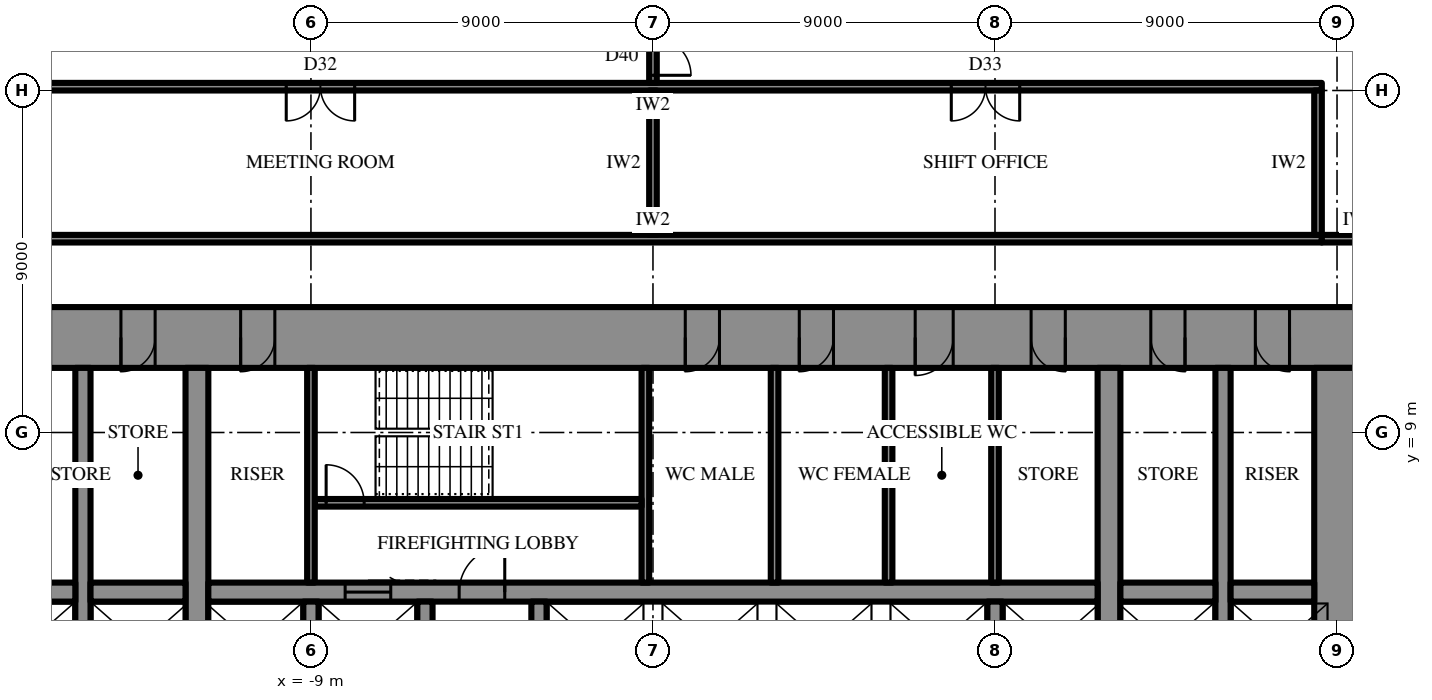
"""IFC4 building model, lengths in metres.
Left out: names, types, materials, properties, quantities, classifications, styles, units other than length and angle.
Written with IfcOpenShell. Run it as: python <this file> out.ifc"""

import sys

from ifc_helpers import new_model, si_unit, direction, frame, frame_2d, origin, place, context, subcontext, project, spatial, rectangle, extrude, element, fill, save


model = new_model("IFC4")
c1 = context("Model", 3, precision=1e-05, world=origin(), true_north=direction((0.0, 1.0)))
c2 = subcontext(c1, "Body", "Model", "MODEL_VIEW")
j1 = project(units=[si_unit("LENGTHUNIT", "METRE"), si_unit("PLANEANGLEUNIT", "RADIAN")], contexts=[c1])
p1 = place(None, origin())
s1 = spatial("IfcSite", under=j1, at=p1, CompositionType="ELEMENT")
p2 = place(p1, origin())
s2 = spatial("IfcBuilding", under=s1, at=p2, CompositionType="ELEMENT")
p3 = place(p2, frame((0.0, 0.0, 31.9)))
s3 = spatial("IfcBuildingStorey", under=s2, at=p3, CompositionType="ELEMENT", Elevation=31.9)
p4 = place(p3, frame((-18.6, 11.5, 0.0), z_axis=(0.0, 0.0, 1.0), x_axis=(1.0, 0.0, 0.0)))
e1 = element("IfcWall", 1, at=p4, inside=s3, PredefinedType="SHEAR", context=c2, shape_type="SweptSolid", body=[
    extrude(rectangle(XDim=37.2, YDim=1.6, at=frame_2d((18.6, 0.0))), origin(), (0.0, 0.0, 1.0), 4.2),
])
p5 = place(p4, frame((19.45, 0.0, 0.0)))
e2 = element("IfcOpeningElement", 2, at=p5, cuts=e1, PredefinedType="OPENING", context=c2, shape_type="SweptSolid", body=[
    extrude(rectangle(XDim=0.9, YDim=2.2, at=frame_2d((0.45, 1.1))), frame((0.0, 0.81, 0.0), z_axis=(0.0, -1.0, 0.0), x_axis=(1.0, 0.0, 0.0)), (0.0, 0.0, 1.0), 1.62),
])
p6 = place(p4, frame((22.45, 0.0, 0.0)))
e3 = element("IfcOpeningElement", 3, at=p6, cuts=e1, PredefinedType="OPENING", context=c2, shape_type="SweptSolid", body=[
    extrude(rectangle(XDim=0.9, YDim=2.2, at=frame_2d((0.45, 1.1))), frame((0.0, 0.81, 0.0), z_axis=(0.0, -1.0, 0.0), x_axis=(1.0, 0.0, 0.0)), (0.0, 0.0, 1.0), 1.62),
])
p7 = place(p4, frame((25.5, 0.0, 0.0)))
e4 = element("IfcOpeningElement", 4, at=p7, cuts=e1, PredefinedType="OPENING", context=c2, shape_type="SweptSolid", body=[
    extrude(rectangle(XDim=1.0, YDim=2.2, at=frame_2d((0.5, 1.1))), frame((0.0, 0.81, 0.0), z_axis=(0.0, -1.0, 0.0), x_axis=(1.0, 0.0, 0.0)), (0.0, 0.0, 1.0), 1.62),
])
p8 = place(p4, frame((1.85, 0.0, 0.0)))
e5 = element("IfcOpeningElement", 5, at=p8, cuts=e1, PredefinedType="OPENING", context=c2, shape_type="SweptSolid", body=[
    extrude(rectangle(XDim=0.9, YDim=2.2, at=frame_2d((0.45, 1.1))), frame((0.0, 0.81, 0.0), z_axis=(0.0, -1.0, 0.0), x_axis=(1.0, 0.0, 0.0)), (0.0, 0.0, 1.0), 1.62),
])
p9 = place(p4, frame((4.6, 0.0, 0.0)))
e6 = element("IfcOpeningElement", 6, at=p9, cuts=e1, PredefinedType="OPENING", context=c2, shape_type="SweptSolid", body=[
    extrude(rectangle(XDim=0.9, YDim=2.2, at=frame_2d((0.45, 1.1))), frame((0.0, 0.81, 0.0), z_axis=(0.0, -1.0, 0.0), x_axis=(1.0, 0.0, 0.0)), (0.0, 0.0, 1.0), 1.62),
])
p10 = place(p4, frame((7.75, 0.0, 0.0)))
e7 = element("IfcOpeningElement", 7, at=p10, cuts=e1, PredefinedType="OPENING", context=c2, shape_type="SweptSolid", body=[
    extrude(rectangle(XDim=0.9, YDim=2.2, at=frame_2d((0.45, 1.1))), frame((0.0, 0.81, 0.0), z_axis=(0.0, -1.0, 0.0), x_axis=(1.0, 0.0, 0.0)), (0.0, 0.0, 1.0), 1.62),
])
p11 = place(p4, frame((28.55, 0.0, 0.0)))
e8 = element("IfcOpeningElement", 8, at=p11, cuts=e1, PredefinedType="OPENING", context=c2, shape_type="SweptSolid", body=[
    extrude(rectangle(XDim=0.9, YDim=2.2, at=frame_2d((0.45, 1.1))), frame((0.0, 0.81, 0.0), z_axis=(0.0, -1.0, 0.0), x_axis=(1.0, 0.0, 0.0)), (0.0, 0.0, 1.0), 1.62),
])
p12 = place(p4, frame((31.7, 0.0, 0.0)))
e9 = element("IfcOpeningElement", 9, at=p12, cuts=e1, PredefinedType="OPENING", context=c2, shape_type="SweptSolid", body=[
    extrude(rectangle(XDim=0.9, YDim=2.2, at=frame_2d((0.45, 1.1))), frame((0.0, 0.81, 0.0), z_axis=(0.0, -1.0, 0.0), x_axis=(1.0, 0.0, 0.0)), (0.0, 0.0, 1.0), 1.62),
])
p13 = place(p4, frame((34.45, 0.0, 0.0)))
e10 = element("IfcOpeningElement", 10, at=p13, cuts=e1, PredefinedType="OPENING", context=c2, shape_type="SweptSolid", body=[
    extrude(rectangle(XDim=0.9, YDim=2.2, at=frame_2d((0.45, 1.1))), frame((0.0, 0.81, 0.0), z_axis=(0.0, -1.0, 0.0), x_axis=(1.0, 0.0, 0.0)), (0.0, 0.0, 1.0), 1.62),
])
p14 = place(p3, frame((18.0, -10.7, 0.0), z_axis=(0.0, 0.0, 1.0), x_axis=(0.0, 1.0, 0.0)))
e11 = element("IfcWall", 11, at=p14, inside=s3, PredefinedType="SHEAR", context=c2, shape_type="SweptSolid", body=[
    extrude(rectangle(XDim=21.4, YDim=1.2, at=frame_2d((10.7, 0.0))), origin(), (0.0, 0.0, 1.0), 4.2),
])
p15 = place(p14, frame((9.8, 0.0, 0.0)))
e12 = element("IfcOpeningElement", 12, at=p15, cuts=e11, PredefinedType="OPENING", context=c2, shape_type="SweptSolid", body=[
    extrude(rectangle(XDim=1.8, YDim=2.4, at=frame_2d((0.9, 1.2))), frame((0.0, 0.61, 0.0), z_axis=(0.0, -1.0, 0.0), x_axis=(1.0, 0.0, 0.0)), (0.0, 0.0, 1.0), 1.22),
])
p16 = place(p3, frame((12.0, -10.7, 0.0), z_axis=(0.0, 0.0, 1.0), x_axis=(0.0, 1.0, 0.0)))
e13 = element("IfcWall", 13, at=p16, inside=s3, PredefinedType="SHEAR", context=c2, shape_type="SweptSolid", body=[
    extrude(rectangle(XDim=21.4, YDim=0.6, at=frame_2d((10.7, 0.0))), origin(), (0.0, 0.0, 1.0), 4.2),
])
p17 = place(p16, frame((9.8, 0.0, 0.0)))
e14 = element("IfcOpeningElement", 14, at=p17, cuts=e13, PredefinedType="OPENING", context=c2, shape_type="SweptSolid", body=[
    extrude(rectangle(XDim=1.8, YDim=2.4, at=frame_2d((0.9, 1.2))), frame((0.0, 0.31, 0.0), z_axis=(0.0, -1.0, 0.0), x_axis=(1.0, 0.0, 0.0)), (0.0, 0.0, 1.0), 0.62),
])
p18 = place(p3, frame((-12.0, -10.7, 0.0), z_axis=(0.0, 0.0, 1.0), x_axis=(0.0, 1.0, 0.0)))
e15 = element("IfcWall", 15, at=p18, inside=s3, PredefinedType="SHEAR", context=c2, shape_type="SweptSolid", body=[
    extrude(rectangle(XDim=21.4, YDim=0.6, at=frame_2d((10.7, 0.0))), origin(), (0.0, 0.0, 1.0), 4.2),
])
p19 = place(p18, frame((9.8, 0.0, 0.0)))
e16 = element("IfcOpeningElement", 16, at=p19, cuts=e15, PredefinedType="OPENING", context=c2, shape_type="SweptSolid", body=[
    extrude(rectangle(XDim=1.8, YDim=2.4, at=frame_2d((0.9, 1.2))), frame((0.0, 0.31, 0.0), z_axis=(0.0, -1.0, 0.0), x_axis=(1.0, 0.0, 0.0)), (0.0, 0.0, 1.0), 0.62),
])
p20 = place(p3, frame((15.0, -10.7, 0.0), z_axis=(0.0, 0.0, 1.0), x_axis=(0.0, 1.0, 0.0)))
e17 = element("IfcWall", 17, at=p20, inside=s3, PredefinedType="SHEAR", context=c2, shape_type="SweptSolid", body=[
    extrude(rectangle(XDim=21.4, YDim=0.4, at=frame_2d((10.7, 0.0))), origin(), (0.0, 0.0, 1.0), 4.2),
])
p21 = place(p20, frame((9.8, 0.0, 0.0)))
e18 = element("IfcOpeningElement", 18, at=p21, cuts=e17, PredefinedType="OPENING", context=c2, shape_type="SweptSolid", body=[
    extrude(rectangle(XDim=1.8, YDim=2.4, at=frame_2d((0.9, 1.2))), frame((0.0, 0.21, 0.0), z_axis=(0.0, -1.0, 0.0), x_axis=(1.0, 0.0, 0.0)), (0.0, 0.0, 1.0), 0.42),
])
p22 = place(p3, frame((-15.0, -10.7, 0.0), z_axis=(0.0, 0.0, 1.0), x_axis=(0.0, 1.0, 0.0)))
e19 = element("IfcWall", 19, at=p22, inside=s3, PredefinedType="SHEAR", context=c2, shape_type="SweptSolid", body=[
    extrude(rectangle(XDim=21.4, YDim=0.4, at=frame_2d((10.7, 0.0))), origin(), (0.0, 0.0, 1.0), 4.2),
])
p23 = place(p22, frame((9.8, 0.0, 0.0)))
e20 = element("IfcOpeningElement", 20, at=p23, cuts=e19, PredefinedType="OPENING", context=c2, shape_type="SweptSolid", body=[
    extrude(rectangle(XDim=1.8, YDim=2.4, at=frame_2d((0.9, 1.2))), frame((0.0, 0.21, 0.0), z_axis=(0.0, -1.0, 0.0), x_axis=(1.0, 0.0, 0.0)), (0.0, 0.0, 1.0), 0.42),
])
p24 = place(p3, frame((-17.4, 4.8, 0.0), z_axis=(0.0, 0.0, 1.0), x_axis=(1.0, 0.0, 0.0)))
e21 = element("IfcWall", 21, at=p24, inside=s3, PredefinedType="SHEAR", context=c2, shape_type="SweptSolid", body=[
    extrude(rectangle(XDim=2.2, YDim=0.5, at=frame_2d((1.1, 0.0))), origin(), (0.0, 0.0, 1.0), 4.2),
])
p25 = place(p3, frame((-14.8, 4.8, 0.0), z_axis=(0.0, 0.0, 1.0), x_axis=(1.0, 0.0, 0.0)))
e22 = element("IfcWall", 22, at=p25, inside=s3, PredefinedType="SHEAR", context=c2, shape_type="SweptSolid", body=[
    extrude(rectangle(XDim=2.5, YDim=0.5, at=frame_2d((1.25, 0.0))), origin(), (0.0, 0.0, 1.0), 4.2),
])
p26 = place(p3, frame((-11.7, 4.8, 0.0), z_axis=(0.0, 0.0, 1.0), x_axis=(1.0, 0.0, 0.0)))
e23 = element("IfcWall", 23, at=p26, inside=s3, PredefinedType="SHEAR", context=c2, shape_type="SweptSolid", body=[
    extrude(rectangle(XDim=23.4, YDim=0.5, at=frame_2d((11.7, 0.0))), origin(), (0.0, 0.0, 1.0), 4.2),
])
p27 = place(p26, frame((6.6, 0.0, 0.0)))
e24 = element("IfcOpeningElement", 24, at=p27, cuts=e23, PredefinedType="OPENING", context=c2, shape_type="SweptSolid", body=[
    extrude(rectangle(XDim=1.2, YDim=2.2, at=frame_2d((0.6, 1.1))), frame((0.0, 0.26, 0.0), z_axis=(0.0, -1.0, 0.0), x_axis=(1.0, 0.0, 0.0)), (0.0, 0.0, 1.0), 0.52),
])
p28 = place(p26, frame((3.6, 0.0, 0.0)))
e25 = element("IfcOpeningElement", 25, at=p28, cuts=e23, PredefinedType="OPENING", context=c2, shape_type="SweptSolid", body=[
    extrude(rectangle(XDim=1.2, YDim=2.2, at=frame_2d((0.6, 1.1))), frame((0.0, 0.26, 0.0), z_axis=(0.0, -1.0, 0.0), x_axis=(1.0, 0.0, 0.0)), (0.0, 0.0, 1.0), 0.52),
])
p29 = place(p3, frame((12.3, 4.8, 0.0), z_axis=(0.0, 0.0, 1.0), x_axis=(1.0, 0.0, 0.0)))
e26 = element("IfcWall", 26, at=p29, inside=s3, PredefinedType="SHEAR", context=c2, shape_type="SweptSolid", body=[
    extrude(rectangle(XDim=2.5, YDim=0.5, at=frame_2d((1.25, 0.0))), origin(), (0.0, 0.0, 1.0), 4.2),
])
p30 = place(p3, frame((15.2, 4.8, 0.0), z_axis=(0.0, 0.0, 1.0), x_axis=(1.0, 0.0, 0.0)))
e27 = element("IfcWall", 27, at=p30, inside=s3, PredefinedType="SHEAR", context=c2, shape_type="SweptSolid", body=[
    extrude(rectangle(XDim=2.2, YDim=0.5, at=frame_2d((1.1, 0.0))), origin(), (0.0, 0.0, 1.0), 4.2),
])
for number, where, z_axis, x_axis in (
    (28, (-9.0, 2.25, 0.0), (0.0, 0.0, 1.0), (0.0, 1.0, 0.0)),
    (29, (-6.0, 2.25, 0.0), (0.0, 0.0, 1.0), (0.0, 1.0, 0.0)),
    (30, (-3.0, 2.25, 0.0), (0.0, 0.0, 1.0), (0.0, 1.0, 0.0)),
    (31, (9.0, 2.25, 0.0), (0.0, 0.0, 1.0), (0.0, 1.0, 0.0)),
):
    element("IfcWall", number, at=place(p3, frame(where, z_axis=z_axis, x_axis=x_axis)), inside=s3, PredefinedType="SHEAR", context=c2, shape_type="SweptSolid", body=[
        extrude(rectangle(XDim=2.3, YDim=0.4, at=frame_2d((1.15, 0.0))), origin(), (0.0, 0.0, 1.0), 4.2),
    ])
p31 = place(p3, frame((-0.2, 5.05, 0.0), z_axis=(0.0, 0.0, 1.0), x_axis=(0.0, 1.0, 0.0)))
e32 = element("IfcWall", 32, at=p31, inside=s3, PredefinedType="SHEAR", context=c2, shape_type="SweptSolid", body=[
    extrude(rectangle(XDim=5.65, YDim=0.2, at=frame_2d((2.825, 0.0))), origin(), (0.0, 0.0, 1.0), 4.2),
])
p32 = place(p3, frame((-8.9, 7.15, 0.0), z_axis=(0.0, 0.0, 1.0), x_axis=(1.0, 0.0, 0.0)))
e33 = element("IfcWall", 33, at=p32, inside=s3, PredefinedType="SHEAR", context=c2, shape_type="SweptSolid", body=[
    extrude(rectangle(XDim=8.6, YDim=0.2, at=frame_2d((4.3, 0.0))), origin(), (0.0, 0.0, 1.0), 4.2),
])
p33 = place(p32, frame((0.3, 0.0, 0.0)))
e34 = element("IfcOpeningElement", 34, at=p33, cuts=e33, PredefinedType="OPENING", context=c2, shape_type="SweptSolid", body=[
    extrude(rectangle(XDim=1.0, YDim=2.2, at=frame_2d((0.5, 1.1))), frame((0.0, 0.11, 0.0), z_axis=(0.0, -1.0, 0.0), x_axis=(1.0, 0.0, 0.0)), (0.0, 0.0, 1.0), 0.22),
])
for number, where, z_axis, x_axis in (
    (35, (-9.0, 5.05, 0.0), (0.0, 0.0, 1.0), (0.0, 1.0, 0.0)),
    (36, (9.0, 5.05, 0.0), (0.0, 0.0, 1.0), (0.0, 1.0, 0.0)),
    (37, (3.2, 5.05, 0.0), (0.0, 0.0, 1.0), (0.0, 1.0, 0.0)),
    (38, (6.2, 5.05, 0.0), (0.0, 0.0, 1.0), (0.0, 1.0, 0.0)),
):
    element("IfcWall", number, at=place(p3, frame(where, z_axis=z_axis, x_axis=x_axis)), inside=s3, PredefinedType="PARTITIONING", context=c2, shape_type="SweptSolid", body=[
        extrude(rectangle(XDim=5.65, YDim=0.2, at=frame_2d((2.825, 0.0))), origin(), (0.0, 0.0, 1.0), 4.0),
    ])
p34 = place(p3, frame((-17.6, 14.1, 0.0), z_axis=(0.0, 0.0, 1.0), x_axis=(1.0, 0.0, 0.0)))
e39 = element("IfcWall", 39, at=p34, inside=s3, PredefinedType="PARTITIONING", context=c2, shape_type="SweptSolid", body=[
    extrude(rectangle(XDim=35.2, YDim=0.2, at=frame_2d((17.6, 0.0))), origin(), (0.0, 0.0, 1.0), 4.0),
])
p35 = place(p3, frame((-17.6, 18.1, 0.0), z_axis=(0.0, 0.0, 1.0), x_axis=(1.0, 0.0, 0.0)))
e40 = element("IfcWall", 40, at=p35, inside=s3, PredefinedType="PARTITIONING", context=c2, shape_type="SweptSolid", body=[
    extrude(rectangle(XDim=35.2, YDim=0.2, at=frame_2d((17.6, 0.0))), origin(), (0.0, 0.0, 1.0), 4.0),
])
p36 = place(p35, frame((7.95, 0.0, 0.0)))
e41 = element("IfcOpeningElement", 41, at=p36, cuts=e40, PredefinedType="OPENING", context=c2, shape_type="SweptSolid", body=[
    extrude(rectangle(XDim=1.8, YDim=2.4, at=frame_2d((0.9, 1.2))), frame((0.0, 0.11, 0.0), z_axis=(0.0, -1.0, 0.0), x_axis=(1.0, 0.0, 0.0)), (0.0, 0.0, 1.0), 0.22),
])
p37 = place(p35, frame((25.45, 0.0, 0.0)))
e42 = element("IfcOpeningElement", 42, at=p37, cuts=e40, PredefinedType="OPENING", context=c2, shape_type="SweptSolid", body=[
    extrude(rectangle(XDim=1.8, YDim=2.4, at=frame_2d((0.9, 1.2))), frame((0.0, 0.11, 0.0), z_axis=(0.0, -1.0, 0.0), x_axis=(1.0, 0.0, 0.0)), (0.0, 0.0, 1.0), 0.22),
])
p38 = place(p3, frame((0.0, 14.2, 0.0), z_axis=(0.0, 0.0, 1.0), x_axis=(0.0, 1.0, 0.0)))
e43 = element("IfcWall", 43, at=p38, inside=s3, PredefinedType="PARTITIONING", context=c2, shape_type="SweptSolid", body=[
    extrude(rectangle(XDim=3.8, YDim=0.2, at=frame_2d((1.9, 0.0))), origin(), (0.0, 0.0, 1.0), 2.944),
])
p39 = place(p3, frame((17.5, 14.2, 0.0), z_axis=(0.0, 0.0, 1.0), x_axis=(0.0, 1.0, 0.0)))
e44 = element("IfcWall", 44, at=p39, inside=s3, PredefinedType="PARTITIONING", context=c2, shape_type="SweptSolid", body=[
    extrude(rectangle(XDim=3.8, YDim=0.2, at=frame_2d((1.9, 0.0))), origin(), (0.0, 0.0, 1.0), 4.0),
])
p40 = place(p3, frame((17.6, 14.1, 0.0), z_axis=(0.0, 0.0, 1.0), x_axis=(1.0, 0.0, 0.0)))
e45 = element("IfcWall", 45, at=p40, inside=s3, PredefinedType="PARTITIONING", context=c2, shape_type="SweptSolid", body=[
    extrude(rectangle(XDim=2.0, YDim=0.2, at=frame_2d((1.0, 0.0))), origin(), (0.0, 0.0, 1.0), 4.0),
])
p41 = place(p3, frame((0.0, 18.2, 0.0), z_axis=(0.0, 0.0, 1.0), x_axis=(0.0, 1.0, 0.0)))
e46 = element("IfcWall", 46, at=p41, inside=s3, PredefinedType="PARTITIONING", context=c2, shape_type="SweptSolid", body=[
    extrude(rectangle(XDim=6.7, YDim=0.2, at=frame_2d((3.35, 0.0))), origin(), (0.0, 0.0, 1.0), 2.944),
])
p42 = place(p41, frame((0.2, 0.0, 0.0)))
e47 = element("IfcOpeningElement", 47, at=p42, cuts=e46, PredefinedType="OPENING", context=c2, shape_type="SweptSolid", body=[
    extrude(rectangle(XDim=1.0, YDim=2.2, at=frame_2d((0.5, 1.1))), frame((0.0, 0.11, 0.0), z_axis=(0.0, -1.0, 0.0), x_axis=(1.0, 0.0, 0.0)), (0.0, 0.0, 1.0), 0.22),
])
p43 = place(p27, origin())
e48 = element("IfcDoor", 48, at=p43, inside=s3, OperationType="SINGLE_SWING_LEFT", PredefinedType="DOOR", context=c2, shape_type="SweptSolid", body=[
    extrude(rectangle(XDim=1.2, YDim=2.2, at=frame_2d((0.6, 1.1))), frame((0.0, 0.025, 0.0), z_axis=(0.0, -1.0, 0.0), x_axis=(1.0, 0.0, 0.0)), (0.0, 0.0, 1.0), 0.05),
])
fill(e24, e48)
p44 = place(p33, origin())
e49 = element("IfcDoor", 49, at=p44, inside=s3, OperationType="SINGLE_SWING_RIGHT", PredefinedType="DOOR", context=c2, shape_type="SweptSolid", body=[
    extrude(rectangle(XDim=1.0, YDim=2.2, at=frame_2d((0.5, 1.1))), frame((0.0, 0.025, 0.0), z_axis=(0.0, -1.0, 0.0), x_axis=(1.0, 0.0, 0.0)), (0.0, 0.0, 1.0), 0.05),
])
fill(e34, e49)
p45 = place(p5, frame((0.9, 0.0, 0.0), z_axis=(0.0, 0.0, 1.0), x_axis=(-1.0, 0.0, 0.0)))
e50 = element("IfcDoor", 50, at=p45, inside=s3, OperationType="SINGLE_SWING_LEFT", PredefinedType="DOOR", context=c2, shape_type="SweptSolid", body=[
    extrude(rectangle(XDim=0.9, YDim=2.2, at=frame_2d((0.45, 1.1))), frame((0.0, 0.025, 0.0), z_axis=(0.0, -1.0, 0.0), x_axis=(1.0, 0.0, 0.0)), (0.0, 0.0, 1.0), 0.05),
])
fill(e2, e50)
p46 = place(p6, frame((0.9, 0.0, 0.0), z_axis=(0.0, 0.0, 1.0), x_axis=(-1.0, 0.0, 0.0)))
e51 = element("IfcDoor", 51, at=p46, inside=s3, OperationType="SINGLE_SWING_LEFT", PredefinedType="DOOR", context=c2, shape_type="SweptSolid", body=[
    extrude(rectangle(XDim=0.9, YDim=2.2, at=frame_2d((0.45, 1.1))), frame((0.0, 0.025, 0.0), z_axis=(0.0, -1.0, 0.0), x_axis=(1.0, 0.0, 0.0)), (0.0, 0.0, 1.0), 0.05),
])
fill(e3, e51)
p47 = place(p7, frame((1.0, 0.0, 0.0), z_axis=(0.0, 0.0, 1.0), x_axis=(-1.0, 0.0, 0.0)))
e52 = element("IfcDoor", 52, at=p47, inside=s3, OperationType="SINGLE_SWING_LEFT", PredefinedType="DOOR", context=c2, shape_type="SweptSolid", body=[
    extrude(rectangle(XDim=1.0, YDim=2.2, at=frame_2d((0.5, 1.1))), frame((0.0, 0.025, 0.0), z_axis=(0.0, -1.0, 0.0), x_axis=(1.0, 0.0, 0.0)), (0.0, 0.0, 1.0), 0.05),
])
fill(e4, e52)
p48 = place(p9, frame((0.9, 0.0, 0.0), z_axis=(0.0, 0.0, 1.0), x_axis=(-1.0, 0.0, 0.0)))
e53 = element("IfcDoor", 53, at=p48, inside=s3, OperationType="SINGLE_SWING_LEFT", PredefinedType="DOOR", context=c2, shape_type="SweptSolid", body=[
    extrude(rectangle(XDim=0.9, YDim=2.2, at=frame_2d((0.45, 1.1))), frame((0.0, 0.025, 0.0), z_axis=(0.0, -1.0, 0.0), x_axis=(1.0, 0.0, 0.0)), (0.0, 0.0, 1.0), 0.05),
])
fill(e6, e53)
p49 = place(p10, frame((0.9, 0.0, 0.0), z_axis=(0.0, 0.0, 1.0), x_axis=(-1.0, 0.0, 0.0)))
e54 = element("IfcDoor", 54, at=p49, inside=s3, OperationType="SINGLE_SWING_LEFT", PredefinedType="DOOR", context=c2, shape_type="SweptSolid", body=[
    extrude(rectangle(XDim=0.9, YDim=2.2, at=frame_2d((0.45, 1.1))), frame((0.0, 0.025, 0.0), z_axis=(0.0, -1.0, 0.0), x_axis=(1.0, 0.0, 0.0)), (0.0, 0.0, 1.0), 0.05),
])
fill(e7, e54)
p50 = place(p11, frame((0.9, 0.0, 0.0), z_axis=(0.0, 0.0, 1.0), x_axis=(-1.0, 0.0, 0.0)))
e55 = element("IfcDoor", 55, at=p50, inside=s3, OperationType="SINGLE_SWING_RIGHT", PredefinedType="DOOR", context=c2, shape_type="SweptSolid", body=[
    extrude(rectangle(XDim=0.9, YDim=2.2, at=frame_2d((0.45, 1.1))), frame((0.0, 0.025, 0.0), z_axis=(0.0, -1.0, 0.0), x_axis=(1.0, 0.0, 0.0)), (0.0, 0.0, 1.0), 0.05),
])
fill(e8, e55)
p51 = place(p12, frame((0.9, 0.0, 0.0), z_axis=(0.0, 0.0, 1.0), x_axis=(-1.0, 0.0, 0.0)))
e56 = element("IfcDoor", 56, at=p51, inside=s3, OperationType="SINGLE_SWING_RIGHT", PredefinedType="DOOR", context=c2, shape_type="SweptSolid", body=[
    extrude(rectangle(XDim=0.9, YDim=2.2, at=frame_2d((0.45, 1.1))), frame((0.0, 0.025, 0.0), z_axis=(0.0, -1.0, 0.0), x_axis=(1.0, 0.0, 0.0)), (0.0, 0.0, 1.0), 0.05),
])
fill(e9, e56)
p52 = place(p13, frame((0.9, 0.0, 0.0), z_axis=(0.0, 0.0, 1.0), x_axis=(-1.0, 0.0, 0.0)))
e57 = element("IfcDoor", 57, at=p52, inside=s3, OperationType="SINGLE_SWING_RIGHT", PredefinedType="DOOR", context=c2, shape_type="SweptSolid", body=[
    extrude(rectangle(XDim=0.9, YDim=2.2, at=frame_2d((0.45, 1.1))), frame((0.0, 0.025, 0.0), z_axis=(0.0, -1.0, 0.0), x_axis=(1.0, 0.0, 0.0)), (0.0, 0.0, 1.0), 0.05),
])
fill(e10, e57)
p53 = place(p28, origin())
e58 = element("IfcDoor", 58, at=p53, inside=s3, OperationType="SLIDING_TO_LEFT", PredefinedType="DOOR", context=c2, shape_type="SweptSolid", body=[
    extrude(rectangle(XDim=1.2, YDim=2.2, at=frame_2d((0.6, 1.1))), frame((0.0, 0.025, 0.0), z_axis=(0.0, -1.0, 0.0), x_axis=(1.0, 0.0, 0.0)), (0.0, 0.0, 1.0), 0.05),
])
fill(e25, e58)
p54 = place(p36, frame((1.8, 0.0, 0.0), z_axis=(0.0, 0.0, 1.0), x_axis=(-1.0, 0.0, 0.0)))
e59 = element("IfcDoor", 59, at=p54, inside=s3, OperationType="DOUBLE_DOOR_SINGLE_SWING", PredefinedType="DOOR", context=c2, shape_type="SweptSolid", body=[
    extrude(rectangle(XDim=1.8, YDim=2.4, at=frame_2d((0.9, 1.2))), frame((0.0, 0.025, 0.0), z_axis=(0.0, -1.0, 0.0), x_axis=(1.0, 0.0, 0.0)), (0.0, 0.0, 1.0), 0.05),
])
fill(e41, e59)
p55 = place(p37, frame((1.8, 0.0, 0.0), z_axis=(0.0, 0.0, 1.0), x_axis=(-1.0, 0.0, 0.0)))
e60 = element("IfcDoor", 60, at=p55, inside=s3, OperationType="DOUBLE_DOOR_SINGLE_SWING", PredefinedType="DOOR", context=c2, shape_type="SweptSolid", body=[
    extrude(rectangle(XDim=1.8, YDim=2.4, at=frame_2d((0.9, 1.2))), frame((0.0, 0.025, 0.0), z_axis=(0.0, -1.0, 0.0), x_axis=(1.0, 0.0, 0.0)), (0.0, 0.0, 1.0), 0.05),
])
fill(e42, e60)
p56 = place(p42, frame((1.0, 0.0, 0.0), z_axis=(0.0, 0.0, 1.0), x_axis=(-1.0, 0.0, 0.0)))
e61 = element("IfcDoor", 61, at=p56, inside=s3, OperationType="SINGLE_SWING_LEFT", PredefinedType="DOOR", context=c2, shape_type="SweptSolid", body=[
    extrude(rectangle(XDim=1.0, YDim=2.2, at=frame_2d((0.5, 1.1))), frame((0.0, 0.025, 0.0), z_axis=(0.0, -1.0, 0.0), x_axis=(1.0, 0.0, 0.0)), (0.0, 0.0, 1.0), 0.05),
])
fill(e47, e61)
save(model, sys.argv[1])
